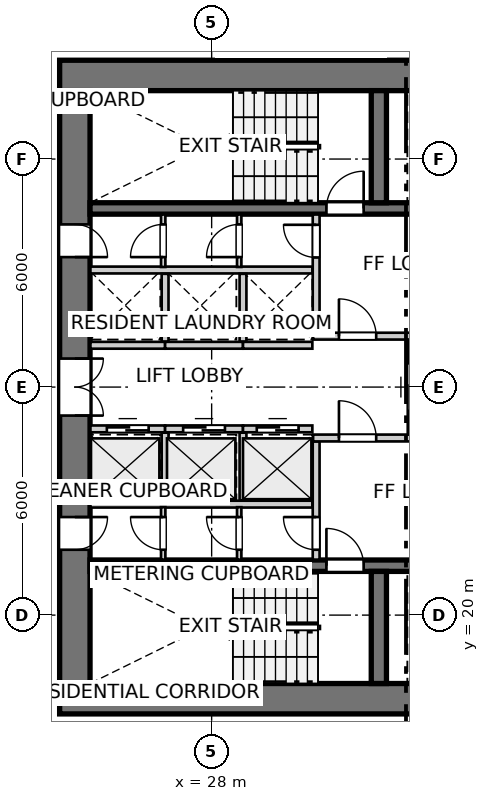
"""IFC4 building model, lengths in metres.
Left out: names, types, materials, properties, quantities, classifications, styles, units other than length and angle.
Written with IfcOpenShell. Run it as: python <this file> out.ifc"""

import sys

from ifc_helpers import new_model, si_unit, direction, frame, frame_2d, origin, place, context, subcontext, project, spatial, rectangle, extrude, source, transform, mapped, element, fill, save


model = new_model("IFC4")
c1 = context("Model", 3, precision=1e-05, world=origin(), true_north=direction((0.0, 1.0)))
c2 = subcontext(c1, "Body", "Model", "MODEL_VIEW")
j1 = project(units=[si_unit("LENGTHUNIT", "METRE"), si_unit("PLANEANGLEUNIT", "RADIAN")], contexts=[c1])
p1 = place(None, origin())
s1 = spatial("IfcSite", under=j1, at=p1, CompositionType="ELEMENT")
p2 = place(p1, origin())
s2 = spatial("IfcBuilding", under=s1, at=p2, CompositionType="ELEMENT")
p3 = place(p2, frame((0.0, 0.0, 33.4)))
s3 = spatial("IfcBuildingStorey", under=s2, at=p3, CompositionType="ELEMENT", Elevation=33.4)
for number, where, z_axis, x_axis in (
    (1, (24.0, 17.8, 0.0), (0.0, 0.0, 1.0), (1.0, 0.0, 0.0)),
    (2, (36.7, 34.2, 0.0), (0.0, 0.0, 1.0), (-1.0, 0.0, 0.0)),
):
    element("IfcWall", number, at=place(p3, frame(where, z_axis=z_axis, x_axis=x_axis)), inside=s3, PredefinedType="SHEAR", context=c2, shape_type="SweptSolid", body=[
        extrude(rectangle(XDim=12.7, YDim=0.8, at=frame_2d((6.35, 0.0))), origin(), (0.0, 0.0, 1.0), 2.94),
    ])
p4 = place(p3, frame((24.4, 33.8, 0.0), z_axis=(0.0, 0.0, 1.0), x_axis=(0.0, -1.0, 0.0)))
e3 = element("IfcWall", 3, at=p4, inside=s3, PredefinedType="SHEAR", context=c2, shape_type="SweptSolid", body=[
    extrude(rectangle(XDim=15.6, YDim=0.8, at=frame_2d((7.8, 0.0))), origin(), (0.0, 0.0, 1.0), 2.94),
])
p5 = place(p4, frame((7.05, 0.0, 0.0)))
e4 = element("IfcOpeningElement", 4, at=p5, cuts=e3, PredefinedType="OPENING", context=c2, shape_type="SweptSolid", body=[
    extrude(rectangle(XDim=1.5, YDim=2.15, at=frame_2d((0.75, 1.075))), frame((0.0, 0.41, 0.0), z_axis=(0.0, -1.0, 0.0), x_axis=(1.0, 0.0, 0.0)), (0.0, 0.0, 1.0), 0.82),
])
p6 = place(p4, frame((3.52, 0.0, 0.0)))
e5 = element("IfcOpeningElement", 5, at=p6, cuts=e3, PredefinedType="OPENING", context=c2, shape_type="SweptSolid", body=[
    extrude(rectangle(XDim=0.86, YDim=2.05, at=frame_2d((0.43, 1.025))), frame((0.0, 0.41, 0.0), z_axis=(0.0, -1.0, 0.0), x_axis=(1.0, 0.0, 0.0)), (0.0, 0.0, 1.0), 0.82),
])
p7 = place(p4, frame((11.22, 0.0, 0.0)))
e6 = element("IfcOpeningElement", 6, at=p7, cuts=e3, PredefinedType="OPENING", context=c2, shape_type="SweptSolid", body=[
    extrude(rectangle(XDim=0.86, YDim=2.05, at=frame_2d((0.43, 1.025))), frame((0.0, 0.41, 0.0), z_axis=(0.0, -1.0, 0.0), x_axis=(1.0, 0.0, 0.0)), (0.0, 0.0, 1.0), 0.82),
])
p8 = place(p3, frame((24.8, 21.3, 0.0), z_axis=(0.0, 0.0, 1.0), x_axis=(1.0, 0.0, 0.0)))
e7 = element("IfcWall", 7, at=p8, inside=s3, PredefinedType="SHEAR", context=c2, shape_type="SweptSolid", body=[
    extrude(rectangle(XDim=11.1, YDim=0.3, at=frame_2d((5.55, 0.0))), origin(), (0.0, 0.0, 1.0), 2.94),
])
p9 = place(p8, frame((6.22, 0.0, 0.0)))
e8 = element("IfcOpeningElement", 8, at=p9, cuts=e7, PredefinedType="OPENING", context=c2, shape_type="SweptSolid", body=[
    extrude(rectangle(XDim=0.98, YDim=2.15, at=frame_2d((0.49, 1.075))), frame((0.0, 0.16, 0.0), z_axis=(0.0, -1.0, 0.0), x_axis=(1.0, 0.0, 0.0)), (0.0, 0.0, 1.0), 0.32),
])
p10 = place(p8, frame((9.15, 0.0, 0.0)))
e9 = element("IfcOpeningElement", 9, at=p10, cuts=e7, PredefinedType="OPENING", context=c2, shape_type="SweptSolid", body=[
    extrude(rectangle(XDim=1.15, YDim=2.15, at=frame_2d((0.575, 1.075))), frame((0.0, 0.16, 0.0), z_axis=(0.0, -1.0, 0.0), x_axis=(1.0, 0.0, 0.0)), (0.0, 0.0, 1.0), 0.32),
])
p11 = place(p3, frame((32.4, 18.2, 0.0), z_axis=(0.0, 0.0, 1.0), x_axis=(0.0, 1.0, 0.0)))
e10 = element("IfcWall", 10, at=p11, inside=s3, PredefinedType="SHEAR", context=c2, shape_type="SweptSolid", body=[
    extrude(rectangle(XDim=2.95, YDim=0.4, at=frame_2d((1.475, 0.0))), origin(), (0.0, 0.0, 1.0), 2.94),
])
p12 = place(p3, frame((24.8, 30.7, 0.0), z_axis=(0.0, 0.0, 1.0), x_axis=(1.0, 0.0, 0.0)))
e11 = element("IfcWall", 11, at=p12, inside=s3, PredefinedType="SHEAR", context=c2, shape_type="SweptSolid", body=[
    extrude(rectangle(XDim=11.1, YDim=0.3, at=frame_2d((5.55, 0.0))), origin(), (0.0, 0.0, 1.0), 2.94),
])
p13 = place(p12, frame((6.22, 0.0, 0.0)))
e12 = element("IfcOpeningElement", 12, at=p13, cuts=e11, PredefinedType="OPENING", context=c2, shape_type="SweptSolid", body=[
    extrude(rectangle(XDim=0.98, YDim=2.15, at=frame_2d((0.49, 1.075))), frame((0.0, 0.16, 0.0), z_axis=(0.0, -1.0, 0.0), x_axis=(1.0, 0.0, 0.0)), (0.0, 0.0, 1.0), 0.32),
])
p14 = place(p12, frame((9.15, 0.0, 0.0)))
e13 = element("IfcOpeningElement", 13, at=p14, cuts=e11, PredefinedType="OPENING", context=c2, shape_type="SweptSolid", body=[
    extrude(rectangle(XDim=1.15, YDim=2.15, at=frame_2d((0.575, 1.075))), frame((0.0, 0.16, 0.0), z_axis=(0.0, -1.0, 0.0), x_axis=(1.0, 0.0, 0.0)), (0.0, 0.0, 1.0), 0.32),
])
p15 = place(p3, frame((32.4, 30.85, 0.0), z_axis=(0.0, 0.0, 1.0), x_axis=(0.0, 1.0, 0.0)))
e14 = element("IfcWall", 14, at=p15, inside=s3, PredefinedType="SHEAR", context=c2, shape_type="SweptSolid", body=[
    extrude(rectangle(XDim=2.95, YDim=0.4, at=frame_2d((1.475, 0.0))), origin(), (0.0, 0.0, 1.0), 2.94),
])
p16 = place(p3, frame((30.75, 21.46, 0.0), z_axis=(0.0, 0.0, 1.0), x_axis=(0.0, 1.0, 0.0)))
e15 = element("IfcWall", 15, at=p16, inside=s3, PredefinedType="PARTITIONING", context=c2, shape_type="SweptSolid", body=[
    extrude(rectangle(XDim=3.11, YDim=0.18, at=frame_2d((1.555, 0.0))), origin(), (0.0, 0.0, 1.0), 2.94),
])
p17 = place(p16, frame((0.26, 0.0, 0.0)))
e16 = element("IfcOpeningElement", 16, at=p17, cuts=e15, PredefinedType="OPENING", context=c2, shape_type="SweptSolid", body=[
    extrude(rectangle(XDim=0.86, YDim=2.05, at=frame_2d((0.43, 1.025))), frame((0.0, 0.1, 0.0), z_axis=(0.0, -1.0, 0.0), x_axis=(1.0, 0.0, 0.0)), (0.0, 0.0, 1.0), 0.2),
])
p18 = place(p3, frame((30.67, 24.66, 0.0), z_axis=(0.0, 0.0, 1.0), x_axis=(1.0, 0.0, 0.0)))
e17 = element("IfcWall", 17, at=p18, inside=s3, PredefinedType="PARTITIONING", context=c2, shape_type="SweptSolid", body=[
    extrude(rectangle(XDim=5.22, YDim=0.18, at=frame_2d((2.61, 0.0))), origin(), (0.0, 0.0, 1.0), 2.94),
])
p19 = place(p18, frame((0.68, 0.0, 0.0)))
e18 = element("IfcOpeningElement", 18, at=p19, cuts=e17, PredefinedType="OPENING", context=c2, shape_type="SweptSolid", body=[
    extrude(rectangle(XDim=0.98, YDim=2.15, at=frame_2d((0.49, 1.075))), frame((0.0, 0.1, 0.0), z_axis=(0.0, -1.0, 0.0), x_axis=(1.0, 0.0, 0.0)), (0.0, 0.0, 1.0), 0.2),
])
p20 = place(p3, frame((30.75, 27.43, 0.0), z_axis=(0.0, 0.0, 1.0), x_axis=(0.0, 1.0, 0.0)))
e19 = element("IfcWall", 19, at=p20, inside=s3, PredefinedType="PARTITIONING", context=c2, shape_type="SweptSolid", body=[
    extrude(rectangle(XDim=3.11, YDim=0.18, at=frame_2d((1.555, 0.0))), origin(), (0.0, 0.0, 1.0), 2.94),
])
p21 = place(p20, frame((1.98, 0.0, 0.0)))
e20 = element("IfcOpeningElement", 20, at=p21, cuts=e19, PredefinedType="OPENING", context=c2, shape_type="SweptSolid", body=[
    extrude(rectangle(XDim=0.86, YDim=2.05, at=frame_2d((0.43, 1.025))), frame((0.0, 0.1, 0.0), z_axis=(0.0, -1.0, 0.0), x_axis=(1.0, 0.0, 0.0)), (0.0, 0.0, 1.0), 0.2),
])
p22 = place(p3, frame((30.67, 27.34, 0.0), z_axis=(0.0, 0.0, 1.0), x_axis=(1.0, 0.0, 0.0)))
e21 = element("IfcWall", 21, at=p22, inside=s3, PredefinedType="PARTITIONING", context=c2, shape_type="SweptSolid", body=[
    extrude(rectangle(XDim=5.22, YDim=0.18, at=frame_2d((2.61, 0.0))), origin(), (0.0, 0.0, 1.0), 2.94),
])
p23 = place(p22, frame((0.68, 0.0, 0.0)))
e22 = element("IfcOpeningElement", 22, at=p23, cuts=e21, PredefinedType="OPENING", context=c2, shape_type="SweptSolid", body=[
    extrude(rectangle(XDim=0.98, YDim=2.15, at=frame_2d((0.49, 1.075))), frame((0.0, 0.1, 0.0), z_axis=(0.0, -1.0, 0.0), x_axis=(1.0, 0.0, 0.0)), (0.0, 0.0, 1.0), 0.2),
])
p24 = place(p3, frame((33.25, 24.76, 0.0), z_axis=(0.0, 0.0, 1.0), x_axis=(0.0, 1.0, 0.0)))
e23 = element("IfcWall", 23, at=p24, inside=s3, PredefinedType="PARTITIONING", context=c2, shape_type="SweptSolid", body=[
    extrude(rectangle(XDim=2.48, YDim=0.18, at=frame_2d((1.24, 0.0))), origin(), (0.0, 0.0, 1.0), 2.94),
])
p25 = place(p24, frame((0.615, 0.0, 0.0)))
e24 = element("IfcOpeningElement", 24, at=p25, cuts=e23, PredefinedType="OPENING", context=c2, shape_type="SweptSolid", body=[
    extrude(rectangle(XDim=1.25, YDim=2.15, at=frame_2d((0.625, 1.075))), frame((0.0, 0.1, 0.0), z_axis=(0.0, -1.0, 0.0), x_axis=(1.0, 0.0, 0.0)), (0.0, 0.0, 1.0), 0.2),
])
p26 = place(p3, frame((24.81, 22.92, 0.0), z_axis=(0.0, 0.0, 1.0), x_axis=(1.0, 0.0, 0.0)))
e25 = element("IfcWall", 25, at=p26, inside=s3, PredefinedType="PARTITIONING", context=c2, shape_type="SweptSolid", body=[
    extrude(rectangle(XDim=5.84, YDim=0.18, at=frame_2d((2.92, 0.0))), origin(), (0.0, 0.0, 1.0), 2.94),
])
p27 = place(p3, frame((24.81, 24.9, 0.0), z_axis=(0.0, 0.0, 1.0), x_axis=(1.0, 0.0, 0.0)))
e26 = element("IfcWall", 26, at=p27, inside=s3, PredefinedType="PARTITIONING", context=c2, shape_type="SweptSolid", body=[
    extrude(rectangle(XDim=1.965, YDim=0.18, at=frame_2d((0.982, 0.0))), origin(), (0.0, 0.0, 1.0), 2.94),
])
p28 = place(p27, frame((0.433, 0.0, 0.0)))
e27 = element("IfcOpeningElement", 27, at=p28, cuts=e26, PredefinedType="OPENING", context=c2, shape_type="SweptSolid", body=[
    extrude(rectangle(XDim=1.1, YDim=2.15, at=frame_2d((0.55, 1.075))), frame((0.0, 0.1, 0.0), z_axis=(0.0, -1.0, 0.0), x_axis=(1.0, 0.0, 0.0)), (0.0, 0.0, 1.0), 0.2),
])
p29 = place(p3, frame((26.775, 24.9, 0.0), z_axis=(0.0, 0.0, 1.0), x_axis=(1.0, 0.0, 0.0)))
e28 = element("IfcWall", 28, at=p29, inside=s3, PredefinedType="PARTITIONING", context=c2, shape_type="SweptSolid", body=[
    extrude(rectangle(XDim=2.05, YDim=0.18, at=frame_2d((1.025, 0.0))), origin(), (0.0, 0.0, 1.0), 2.94),
])
p30 = place(p29, frame((0.475, 0.0, 0.0)))
e29 = element("IfcOpeningElement", 29, at=p30, cuts=e28, PredefinedType="OPENING", context=c2, shape_type="SweptSolid", body=[
    extrude(rectangle(XDim=1.1, YDim=2.15, at=frame_2d((0.55, 1.075))), frame((0.0, 0.1, 0.0), z_axis=(0.0, -1.0, 0.0), x_axis=(1.0, 0.0, 0.0)), (0.0, 0.0, 1.0), 0.2),
])
p31 = place(p3, frame((26.775, 23.02, 0.0), z_axis=(0.0, 0.0, 1.0), x_axis=(0.0, 1.0, 0.0)))
e30 = element("IfcWall", 30, at=p31, inside=s3, PredefinedType="PARTITIONING", context=c2, shape_type="SweptSolid", body=[
    extrude(rectangle(XDim=1.78, YDim=0.18, at=frame_2d((0.89, 0.0))), origin(), (0.0, 0.0, 1.0), 2.94),
])
p32 = place(p3, frame((28.825, 24.9, 0.0), z_axis=(0.0, 0.0, 1.0), x_axis=(1.0, 0.0, 0.0)))
e31 = element("IfcWall", 31, at=p32, inside=s3, PredefinedType="PARTITIONING", context=c2, shape_type="SweptSolid", body=[
    extrude(rectangle(XDim=1.825, YDim=0.18, at=frame_2d((0.913, 0.0))), origin(), (0.0, 0.0, 1.0), 2.94),
])
p33 = place(p32, frame((0.363, 0.0, 0.0)))
e32 = element("IfcOpeningElement", 32, at=p33, cuts=e31, PredefinedType="OPENING", context=c2, shape_type="SweptSolid", body=[
    extrude(rectangle(XDim=1.1, YDim=2.15, at=frame_2d((0.55, 1.075))), frame((0.0, 0.1, 0.0), z_axis=(0.0, -1.0, 0.0), x_axis=(1.0, 0.0, 0.0)), (0.0, 0.0, 1.0), 0.2),
])
p34 = place(p3, frame((28.825, 23.02, 0.0), z_axis=(0.0, 0.0, 1.0), x_axis=(0.0, 1.0, 0.0)))
e33 = element("IfcWall", 33, at=p34, inside=s3, PredefinedType="PARTITIONING", context=c2, shape_type="SweptSolid", body=[
    extrude(rectangle(XDim=1.78, YDim=0.18, at=frame_2d((0.89, 0.0))), origin(), (0.0, 0.0, 1.0), 2.94),
])
p35 = place(p3, frame((24.81, 29.08, 0.0), z_axis=(0.0, 0.0, 1.0), x_axis=(1.0, 0.0, 0.0)))
e34 = element("IfcWall", 34, at=p35, inside=s3, PredefinedType="PARTITIONING", context=c2, shape_type="SweptSolid", body=[
    extrude(rectangle(XDim=5.84, YDim=0.18, at=frame_2d((2.92, 0.0))), origin(), (0.0, 0.0, 1.0), 2.94),
])
p36 = place(p3, frame((24.81, 27.1, 0.0), z_axis=(0.0, 0.0, 1.0), x_axis=(1.0, 0.0, 0.0)))
e35 = element("IfcWall", 35, at=p36, inside=s3, PredefinedType="PARTITIONING", context=c2, shape_type="SweptSolid", body=[
    extrude(rectangle(XDim=1.965, YDim=0.18, at=frame_2d((0.982, 0.0))), origin(), (0.0, 0.0, 1.0), 2.94),
])
p37 = place(p3, frame((26.775, 27.1, 0.0), z_axis=(0.0, 0.0, 1.0), x_axis=(1.0, 0.0, 0.0)))
e36 = element("IfcWall", 36, at=p37, inside=s3, PredefinedType="PARTITIONING", context=c2, shape_type="SweptSolid", body=[
    extrude(rectangle(XDim=2.05, YDim=0.18, at=frame_2d((1.025, 0.0))), origin(), (0.0, 0.0, 1.0), 2.94),
])
p38 = place(p3, frame((26.775, 27.2, 0.0), z_axis=(0.0, 0.0, 1.0), x_axis=(0.0, 1.0, 0.0)))
e37 = element("IfcWall", 37, at=p38, inside=s3, PredefinedType="PARTITIONING", context=c2, shape_type="SweptSolid", body=[
    extrude(rectangle(XDim=1.78, YDim=0.18, at=frame_2d((0.89, 0.0))), origin(), (0.0, 0.0, 1.0), 2.94),
])
p39 = place(p3, frame((28.825, 27.1, 0.0), z_axis=(0.0, 0.0, 1.0), x_axis=(1.0, 0.0, 0.0)))
e38 = element("IfcWall", 38, at=p39, inside=s3, PredefinedType="PARTITIONING", context=c2, shape_type="SweptSolid", body=[
    extrude(rectangle(XDim=1.825, YDim=0.18, at=frame_2d((0.913, 0.0))), origin(), (0.0, 0.0, 1.0), 2.94),
])
p40 = place(p3, frame((28.825, 27.2, 0.0), z_axis=(0.0, 0.0, 1.0), x_axis=(0.0, 1.0, 0.0)))
e39 = element("IfcWall", 39, at=p40, inside=s3, PredefinedType="PARTITIONING", context=c2, shape_type="SweptSolid", body=[
    extrude(rectangle(XDim=1.78, YDim=0.18, at=frame_2d((0.89, 0.0))), origin(), (0.0, 0.0, 1.0), 2.94),
])
p41 = place(p3, frame((26.725, 21.46, 0.0), z_axis=(0.0, 0.0, 1.0), x_axis=(0.0, 1.0, 0.0)))
e40 = element("IfcWall", 40, at=p41, inside=s3, PredefinedType="PARTITIONING", context=c2, shape_type="SweptSolid", body=[
    extrude(rectangle(XDim=1.38, YDim=0.115, at=frame_2d((0.69, 0.0))), origin(), (0.0, 0.0, 1.0), 2.94),
])
p42 = place(p41, frame((0.26, 0.0, 0.0)))
e41 = element("IfcOpeningElement", 41, at=p42, cuts=e40, PredefinedType="OPENING", context=c2, shape_type="SweptSolid", body=[
    extrude(rectangle(XDim=0.86, YDim=2.05, at=frame_2d((0.43, 1.025))), frame((0.0, 0.067, 0.0), z_axis=(0.0, -1.0, 0.0), x_axis=(1.0, 0.0, 0.0)), (0.0, 0.0, 1.0), 0.135),
])
p43 = place(p3, frame((26.725, 29.16, 0.0), z_axis=(0.0, 0.0, 1.0), x_axis=(0.0, 1.0, 0.0)))
e42 = element("IfcWall", 42, at=p43, inside=s3, PredefinedType="PARTITIONING", context=c2, shape_type="SweptSolid", body=[
    extrude(rectangle(XDim=1.38, YDim=0.115, at=frame_2d((0.69, 0.0))), origin(), (0.0, 0.0, 1.0), 2.94),
])
p44 = place(p43, frame((0.26, 0.0, 0.0)))
e43 = element("IfcOpeningElement", 43, at=p44, cuts=e42, PredefinedType="OPENING", context=c2, shape_type="SweptSolid", body=[
    extrude(rectangle(XDim=0.86, YDim=2.05, at=frame_2d((0.43, 1.025))), frame((0.0, 0.067, 0.0), z_axis=(0.0, -1.0, 0.0), x_axis=(1.0, 0.0, 0.0)), (0.0, 0.0, 1.0), 0.135),
])
p45 = place(p3, frame((28.725, 21.46, 0.0), z_axis=(0.0, 0.0, 1.0), x_axis=(0.0, 1.0, 0.0)))
e44 = element("IfcWall", 44, at=p45, inside=s3, PredefinedType="PARTITIONING", context=c2, shape_type="SweptSolid", body=[
    extrude(rectangle(XDim=1.38, YDim=0.115, at=frame_2d((0.69, 0.0))), origin(), (0.0, 0.0, 1.0), 2.94),
])
p46 = place(p45, frame((0.26, 0.0, 0.0)))
e45 = element("IfcOpeningElement", 45, at=p46, cuts=e44, PredefinedType="OPENING", context=c2, shape_type="SweptSolid", body=[
    extrude(rectangle(XDim=0.86, YDim=2.05, at=frame_2d((0.43, 1.025))), frame((0.0, 0.067, 0.0), z_axis=(0.0, -1.0, 0.0), x_axis=(1.0, 0.0, 0.0)), (0.0, 0.0, 1.0), 0.135),
])
p47 = place(p3, frame((28.725, 29.16, 0.0), z_axis=(0.0, 0.0, 1.0), x_axis=(0.0, 1.0, 0.0)))
e46 = element("IfcWall", 46, at=p47, inside=s3, PredefinedType="PARTITIONING", context=c2, shape_type="SweptSolid", body=[
    extrude(rectangle(XDim=1.38, YDim=0.115, at=frame_2d((0.69, 0.0))), origin(), (0.0, 0.0, 1.0), 2.94),
])
p48 = place(p47, frame((0.26, 0.0, 0.0)))
e47 = element("IfcOpeningElement", 47, at=p48, cuts=e46, PredefinedType="OPENING", context=c2, shape_type="SweptSolid", body=[
    extrude(rectangle(XDim=0.86, YDim=2.05, at=frame_2d((0.43, 1.025))), frame((0.0, 0.067, 0.0), z_axis=(0.0, -1.0, 0.0), x_axis=(1.0, 0.0, 0.0)), (0.0, 0.0, 1.0), 0.135),
])
m1 = source(origin(), c2, "Body", "SweptSolid", [
    extrude(rectangle(XDim=0.98, YDim=2.15, at=frame_2d((0.49, 1.075))), frame((0.0, 0.025, 0.0), z_axis=(0.0, -1.0, 0.0), x_axis=(1.0, 0.0, 0.0)), (0.0, 0.0, 1.0), 0.05),
])
p49 = place(p9, origin())
e48 = element("IfcDoor", 48, at=p49, inside=s3, OperationType="SINGLE_SWING_LEFT", PredefinedType="DOOR", context=c2, shape_type="MappedRepresentation", body=[
    mapped(m1, transform((0.0, 0.0, 0.0), x_axis=(1.0, 0.0, 0.0), y_axis=(0.0, 1.0, 0.0), z_axis=(0.0, 0.0, 1.0), scale=1.0)),
])
fill(e8, e48)
p50 = place(p13, origin())
e49 = element("IfcDoor", 49, at=p50, inside=s3, OperationType="SINGLE_SWING_RIGHT", PredefinedType="DOOR", context=c2, shape_type="MappedRepresentation", body=[
    mapped(m1, transform((0.0, 0.0, 0.0), x_axis=(1.0, 0.0, 0.0), y_axis=(0.0, 1.0, 0.0), z_axis=(0.0, 0.0, 1.0), scale=1.0)),
])
fill(e12, e49)
m2 = source(origin(), c2, "Body", "SweptSolid", [
    extrude(rectangle(XDim=1.5, YDim=2.15, at=frame_2d((0.75, 1.075))), frame((0.0, 0.025, 0.0), z_axis=(0.0, -1.0, 0.0), x_axis=(1.0, 0.0, 0.0)), (0.0, 0.0, 1.0), 0.05),
])
p51 = place(p5, origin())
e50 = element("IfcDoor", 50, at=p51, inside=s3, OperationType="DOUBLE_DOOR_SINGLE_SWING", PredefinedType="DOOR", context=c2, shape_type="MappedRepresentation", body=[
    mapped(m2, transform((0.0, 0.0, 0.0), x_axis=(1.0, 0.0, 0.0), y_axis=(0.0, 1.0, 0.0), z_axis=(0.0, 0.0, 1.0), scale=1.0)),
])
fill(e4, e50)
m3 = source(origin(), c2, "Body", "SweptSolid", [
    extrude(rectangle(XDim=0.86, YDim=2.05, at=frame_2d((0.43, 1.025))), frame((0.0, 0.025, 0.0), z_axis=(0.0, -1.0, 0.0), x_axis=(1.0, 0.0, 0.0)), (0.0, 0.0, 1.0), 0.05),
])
p52 = place(p6, origin())
e51 = element("IfcDoor", 51, at=p52, inside=s3, OperationType="SINGLE_SWING_RIGHT", PredefinedType="DOOR", context=c2, shape_type="MappedRepresentation", body=[
    mapped(m3, transform((0.0, 0.0, 0.0), x_axis=(1.0, 0.0, 0.0), y_axis=(0.0, 1.0, 0.0), z_axis=(0.0, 0.0, 1.0), scale=1.0)),
])
fill(e5, e51)
p53 = place(p7, origin())
e52 = element("IfcDoor", 52, at=p53, inside=s3, OperationType="SINGLE_SWING_LEFT", PredefinedType="DOOR", context=c2, shape_type="MappedRepresentation", body=[
    mapped(m3, transform((0.0, 0.0, 0.0), x_axis=(1.0, 0.0, 0.0), y_axis=(0.0, 1.0, 0.0), z_axis=(0.0, 0.0, 1.0), scale=1.0)),
])
fill(e6, e52)
p54 = place(p17, origin())
e53 = element("IfcDoor", 53, at=p54, inside=s3, OperationType="SINGLE_SWING_RIGHT", PredefinedType="DOOR", context=c2, shape_type="MappedRepresentation", body=[
    mapped(m3, transform((0.0, 0.0, 0.0), x_axis=(1.0, 0.0, 0.0), y_axis=(0.0, 1.0, 0.0), z_axis=(0.0, 0.0, 1.0), scale=1.0)),
])
fill(e16, e53)
p55 = place(p19, origin())
e54 = element("IfcDoor", 54, at=p55, inside=s3, OperationType="SINGLE_SWING_LEFT", PredefinedType="DOOR", context=c2, shape_type="MappedRepresentation", body=[
    mapped(m1, transform((0.0, 0.0, 0.0), x_axis=(1.0, 0.0, 0.0), y_axis=(0.0, 1.0, 0.0), z_axis=(0.0, 0.0, 1.0), scale=1.0)),
])
fill(e18, e54)
p56 = place(p21, origin())
e55 = element("IfcDoor", 55, at=p56, inside=s3, OperationType="SINGLE_SWING_RIGHT", PredefinedType="DOOR", context=c2, shape_type="MappedRepresentation", body=[
    mapped(m3, transform((0.0, 0.0, 0.0), x_axis=(1.0, 0.0, 0.0), y_axis=(0.0, 1.0, 0.0), z_axis=(0.0, 0.0, 1.0), scale=1.0)),
])
fill(e20, e55)
p57 = place(p23, origin())
e56 = element("IfcDoor", 56, at=p57, inside=s3, OperationType="SINGLE_SWING_LEFT", PredefinedType="DOOR", context=c2, shape_type="MappedRepresentation", body=[
    mapped(m1, transform((0.0, 0.0, 0.0), x_axis=(1.0, 0.0, 0.0), y_axis=(0.0, 1.0, 0.0), z_axis=(0.0, 0.0, 1.0), scale=1.0)),
])
fill(e22, e56)
m4 = source(origin(), c2, "Body", "SweptSolid", [
    extrude(rectangle(XDim=1.1, YDim=2.15, at=frame_2d((0.55, 1.075))), frame((0.0, 0.025, 0.0), z_axis=(0.0, -1.0, 0.0), x_axis=(1.0, 0.0, 0.0)), (0.0, 0.0, 1.0), 0.05),
])
p58 = place(p28, origin())
e57 = element("IfcDoor", 57, at=p58, inside=s3, OperationType="DOUBLE_DOOR_SLIDING", PredefinedType="DOOR", context=c2, shape_type="MappedRepresentation", body=[
    mapped(m4, transform((0.0, 0.0, 0.0), x_axis=(1.0, 0.0, 0.0), y_axis=(0.0, 1.0, 0.0), z_axis=(0.0, 0.0, 1.0), scale=1.0)),
])
fill(e27, e57)
p59 = place(p30, origin())
e58 = element("IfcDoor", 58, at=p59, inside=s3, OperationType="DOUBLE_DOOR_SLIDING", PredefinedType="DOOR", context=c2, shape_type="MappedRepresentation", body=[
    mapped(m4, transform((0.0, 0.0, 0.0), x_axis=(1.0, 0.0, 0.0), y_axis=(0.0, 1.0, 0.0), z_axis=(0.0, 0.0, 1.0), scale=1.0)),
])
fill(e29, e58)
p60 = place(p33, origin())
e59 = element("IfcDoor", 59, at=p60, inside=s3, OperationType="DOUBLE_DOOR_SLIDING", PredefinedType="DOOR", context=c2, shape_type="MappedRepresentation", body=[
    mapped(m4, transform((0.0, 0.0, 0.0), x_axis=(1.0, 0.0, 0.0), y_axis=(0.0, 1.0, 0.0), z_axis=(0.0, 0.0, 1.0), scale=1.0)),
])
fill(e32, e59)
p61 = place(p42, origin())
e60 = element("IfcDoor", 60, at=p61, inside=s3, OperationType="SINGLE_SWING_RIGHT", PredefinedType="DOOR", context=c2, shape_type="MappedRepresentation", body=[
    mapped(m3, transform((0.0, 0.0, 0.0), x_axis=(1.0, 0.0, 0.0), y_axis=(0.0, 1.0, 0.0), z_axis=(0.0, 0.0, 1.0), scale=1.0)),
])
fill(e41, e60)
p62 = place(p44, origin())
e61 = element("IfcDoor", 61, at=p62, inside=s3, OperationType="SINGLE_SWING_LEFT", PredefinedType="DOOR", context=c2, shape_type="MappedRepresentation", body=[
    mapped(m3, transform((0.0, 0.0, 0.0), x_axis=(1.0, 0.0, 0.0), y_axis=(0.0, 1.0, 0.0), z_axis=(0.0, 0.0, 1.0), scale=1.0)),
])
fill(e43, e61)
p63 = place(p46, origin())
e62 = element("IfcDoor", 62, at=p63, inside=s3, OperationType="SINGLE_SWING_RIGHT", PredefinedType="DOOR", context=c2, shape_type="MappedRepresentation", body=[
    mapped(m3, transform((0.0, 0.0, 0.0), x_axis=(1.0, 0.0, 0.0), y_axis=(0.0, 1.0, 0.0), z_axis=(0.0, 0.0, 1.0), scale=1.0)),
])
fill(e45, e62)
p64 = place(p48, origin())
e63 = element("IfcDoor", 63, at=p64, inside=s3, OperationType="SINGLE_SWING_LEFT", PredefinedType="DOOR", context=c2, shape_type="MappedRepresentation", body=[
    mapped(m3, transform((0.0, 0.0, 0.0), x_axis=(1.0, 0.0, 0.0), y_axis=(0.0, 1.0, 0.0), z_axis=(0.0, 0.0, 1.0), scale=1.0)),
])
fill(e47, e63)
save(model, sys.argv[1])
